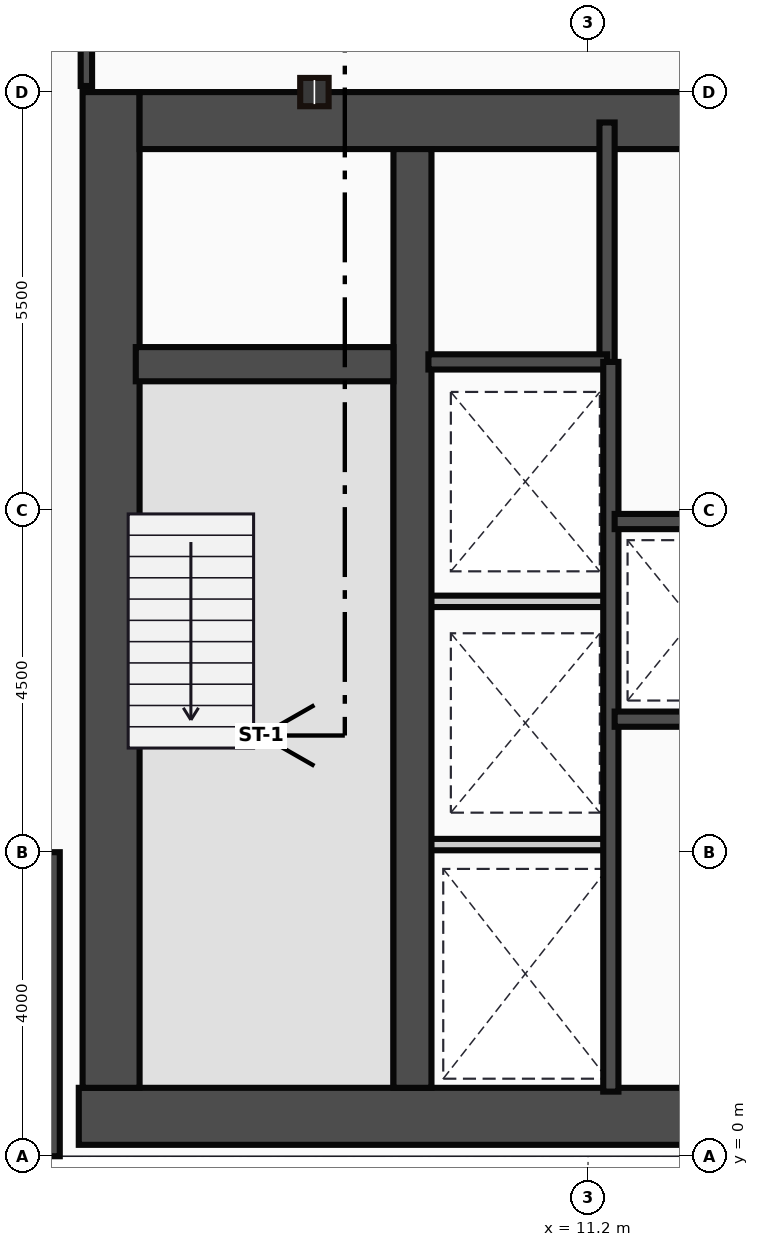
"""IFC4 building model, lengths in metres.
Left out: names, types, materials, properties, quantities, classifications, styles, units other than length and angle.
Written with IfcOpenShell. Run it as: python <this file> out.ifc"""

import sys

from ifc_helpers import new_model, si_unit, direction, frame, frame_2d, origin, origin_2d, place, context, subcontext, project, spatial, rectangle, i_section, extrude, source, transform, mapped, element, fill, save


model = new_model("IFC4")
c1 = context("Model", 3, precision=1e-05, world=origin(), true_north=direction((0.0, 1.0)))
c2 = subcontext(c1, "Body", "Model", "MODEL_VIEW")
j1 = project(units=[si_unit("LENGTHUNIT", "METRE"), si_unit("PLANEANGLEUNIT", "RADIAN")], contexts=[c1])
p1 = place(None, origin())
s1 = spatial("IfcSite", under=j1, at=p1, CompositionType="ELEMENT")
p2 = place(p1, origin())
s2 = spatial("IfcBuilding", under=s1, at=p2, CompositionType="ELEMENT")
p3 = place(p2, frame((0.0, 0.0, 184.4)))
s3 = spatial("IfcBuildingStorey", under=s2, at=p3, CompositionType="ELEMENT", Elevation=184.4)
m1 = source(origin(), c2, "Body", "SweptSolid", [
    extrude(rectangle(XDim=29.5, YDim=0.75, at=frame_2d((14.75, 0.0))), origin(), (0.0, 0.0, 1.0), 4.2),
])
p4 = place(p3, frame((4.5, 0.525, 0.0), z_axis=(0.0, 0.0, 1.0), x_axis=(1.0, 0.0, 0.0)))
e1 = element("IfcWall", 1, at=p4, inside=s3, PredefinedType="SHEAR", context=c2, shape_type="MappedRepresentation", body=[
    mapped(m1, transform((0.0, 0.0, 0.0))),
])
m2 = source(origin(), c2, "Body", "SweptSolid", [
    extrude(rectangle(XDim=13.1, YDim=0.75, at=frame_2d((6.55, 0.0))), origin(), (0.0, 0.0, 1.0), 4.2),
])
p5 = place(p3, frame((4.925, 0.9, 0.0), z_axis=(0.0, 0.0, 1.0), x_axis=(0.0, 1.0, 0.0)))
e2 = element("IfcWall", 2, at=p5, inside=s3, PredefinedType="SHEAR", context=c2, shape_type="MappedRepresentation", body=[
    mapped(m2, transform((0.0, 0.0, 0.0))),
])
m3 = source(origin(), c2, "Body", "SweptSolid", [
    extrude(rectangle(XDim=9.1, YDim=0.75, at=frame_2d((4.55, 0.0))), origin(), (0.0, 0.0, 1.0), 4.2),
])
p6 = place(p3, frame((5.3, 13.625, 0.0), z_axis=(0.0, 0.0, 1.0), x_axis=(1.0, 0.0, 0.0)))
e3 = element("IfcWall", 3, at=p6, inside=s3, PredefinedType="SHEAR", context=c2, shape_type="MappedRepresentation", body=[
    mapped(m3, transform((0.0, 0.0, 0.0))),
])
p7 = place(p6, frame((4.1, 0.0, 0.0)))
e4 = element("IfcOpeningElement", 4, at=p7, cuts=e3, PredefinedType="OPENING", context=c2, shape_type="SweptSolid", body=[
    extrude(rectangle(XDim=1.1, YDim=2.15, at=frame_2d((0.55, 1.075))), frame((0.0, 0.385, 0.0), z_axis=(0.0, -1.0, 0.0), x_axis=(1.0, 0.0, 0.0)), (0.0, 0.0, 1.0), 0.77),
])
m4 = source(origin(), c2, "Body", "SweptSolid", [
    extrude(rectangle(XDim=12.35, YDim=0.5, at=frame_2d((6.175, 0.0))), origin(), (0.0, 0.0, 1.0), 4.2),
])
p8 = place(p3, frame((8.89, 0.9, 0.0), z_axis=(0.0, 0.0, 1.0), x_axis=(0.0, 1.0, 0.0)))
e5 = element("IfcWall", 5, at=p8, inside=s3, PredefinedType="SHEAR", context=c2, shape_type="MappedRepresentation", body=[
    mapped(m4, transform((0.0, 0.0, 0.0))),
])
m5 = source(origin(), c2, "Body", "SweptSolid", [
    extrude(rectangle(XDim=3.39, YDim=0.45, at=frame_2d((1.695, 0.0))), origin(), (0.0, 0.0, 1.0), 4.2),
])
p9 = place(p3, frame((5.25, 10.42, 0.0), z_axis=(0.0, 0.0, 1.0), x_axis=(1.0, 0.0, 0.0)))
e6 = element("IfcWall", 6, at=p9, inside=s3, PredefinedType="SHEAR", context=c2, shape_type="MappedRepresentation", body=[
    mapped(m5, transform((0.0, 0.0, 0.0))),
])
p10 = place(p9, frame((1.05, 0.0, 0.0)))
e7 = element("IfcOpeningElement", 7, at=p10, cuts=e6, PredefinedType="OPENING", context=c2, shape_type="SweptSolid", body=[
    extrude(rectangle(XDim=1.1, YDim=2.15, at=frame_2d((0.55, 1.075))), frame((0.0, 0.235, 0.0), z_axis=(0.0, -1.0, 0.0), x_axis=(1.0, 0.0, 0.0)), (0.0, 0.0, 1.0), 0.47),
])
m6 = source(origin(), c2, "Body", "SweptSolid", [
    extrude(i_section(OverallWidth=0.374, OverallDepth=0.372, WebThickness=0.016, FlangeThickness=0.026, at=origin_2d()), origin(), (0.0, 0.0, 1.0), 4.2),
])
p11 = place(p3, frame((7.6, 14.0, 0.0), z_axis=(0.0, 0.0, 1.0), x_axis=(1.0, 0.0, 0.0)))
e8 = element("IfcColumn", 8, at=p11, inside=s3, PredefinedType="COLUMN", context=c2, shape_type="MappedRepresentation", body=[
    mapped(m6, transform((0.0, 0.0, 0.0))),
])
m7 = source(origin(), c2, "Body", "SweptSolid", [
    extrude(rectangle(XDim=4.0, YDim=0.25, at=frame_2d((2.0, 0.0))), origin(), (0.0, 0.0, 1.0), 3.95),
])
p12 = place(p3, frame((4.125, 4.0, 0.0), z_axis=(0.0, 0.0, 1.0), x_axis=(0.0, -1.0, 0.0)))
e9 = element("IfcWall", 9, at=p12, inside=s3, PredefinedType="STANDARD", context=c2, shape_type="MappedRepresentation", body=[
    mapped(m7, transform((0.0, 0.0, 0.0))),
])
m8 = source(origin(), c2, "Body", "SweptSolid", [
    extrude(rectangle(XDim=3.18, YDim=0.2, at=frame_2d((1.59, 0.0))), origin(), (0.0, 0.0, 1.0), 3.95),
])
p13 = place(p3, frame((11.45, 10.42, 0.0), z_axis=(0.0, 0.0, 1.0), x_axis=(0.0, 1.0, 0.0)))
e10 = element("IfcWall", 10, at=p13, inside=s3, PredefinedType="PARTITIONING", context=c2, shape_type="MappedRepresentation", body=[
    mapped(m8, transform((0.0, 0.0, 0.0))),
])
m9 = source(origin(), c2, "Body", "SweptSolid", [
    extrude(rectangle(XDim=2.35, YDim=0.2, at=frame_2d((1.175, 0.0))), origin(), (0.0, 0.0, 1.0), 3.95),
])
p14 = place(p3, frame((9.1, 10.45, 0.0), z_axis=(0.0, 0.0, 1.0), x_axis=(1.0, 0.0, 0.0)))
e11 = element("IfcWall", 11, at=p14, inside=s3, PredefinedType="PARTITIONING", context=c2, shape_type="MappedRepresentation", body=[
    mapped(m9, transform((0.0, 0.0, 0.0))),
])
p15 = place(p14, frame((0.55, 0.0, 0.0)))
e12 = element("IfcOpeningElement", 12, at=p15, cuts=e11, PredefinedType="OPENING", context=c2, shape_type="SweptSolid", body=[
    extrude(rectangle(XDim=1.1, YDim=2.15, at=frame_2d((0.55, 1.075))), frame((0.0, 0.11, 0.0), z_axis=(0.0, -1.0, 0.0), x_axis=(1.0, 0.0, 0.0)), (0.0, 0.0, 1.0), 0.22),
])
m10 = source(origin(), c2, "Body", "SweptSolid", [
    extrude(rectangle(XDim=9.6, YDim=0.2, at=frame_2d((4.8, 0.0))), origin(), (0.0, 0.0, 1.0), 3.95),
])
p16 = place(p3, frame((11.5, 0.85, 0.0), z_axis=(0.0, 0.0, 1.0), x_axis=(0.0, 1.0, 0.0)))
e13 = element("IfcWall", 13, at=p16, inside=s3, PredefinedType="PARTITIONING", context=c2, shape_type="MappedRepresentation", body=[
    mapped(m10, transform((0.0, 0.0, 0.0))),
])
p17 = place(p16, frame((4.2, 0.0, 0.0)))
e14 = element("IfcOpeningElement", 14, at=p17, cuts=e13, PredefinedType="OPENING", context=c2, shape_type="SweptSolid", body=[
    extrude(rectangle(XDim=1.1, YDim=2.15, at=frame_2d((0.55, 1.075))), frame((0.0, 0.11, 0.0), z_axis=(0.0, -1.0, 0.0), x_axis=(1.0, 0.0, 0.0)), (0.0, 0.0, 1.0), 0.22),
])
p18 = place(p16, frame((0.9, 0.0, 0.0)))
e15 = element("IfcOpeningElement", 15, at=p18, cuts=e13, PredefinedType="OPENING", context=c2, shape_type="SweptSolid", body=[
    extrude(rectangle(XDim=1.2, YDim=2.15, at=frame_2d((0.6, 1.075))), frame((0.0, 0.11, 0.0), z_axis=(0.0, -1.0, 0.0), x_axis=(1.0, 0.0, 0.0)), (0.0, 0.0, 1.0), 0.22),
])
m11 = source(origin(), c2, "Body", "SweptSolid", [
    extrude(rectangle(XDim=2.4, YDim=0.15, at=frame_2d((1.2, 0.0))), origin(), (0.0, 0.0, 1.0), 3.95),
])
for number, where, z_axis, x_axis in (
    (16, (9.1, 4.1, 0.0), (0.0, 0.0, 1.0), (1.0, 0.0, 0.0)),
    (17, (9.1, 7.3, 0.0), (0.0, 0.0, 1.0), (1.0, 0.0, 0.0)),
):
    element("IfcWall", number, at=place(p3, frame(where, z_axis=z_axis, x_axis=x_axis)), inside=s3, PredefinedType="PARTITIONING", context=c2, shape_type="MappedRepresentation", body=[
        mapped(m11, transform((0.0, 0.0, 0.0))),
    ])
m12 = source(origin(), c2, "Body", "SweptSolid", [
    extrude(rectangle(XDim=11.85, YDim=0.2, at=frame_2d((5.925, 0.0))), origin(), (0.0, 0.0, 1.0), 3.95),
])
p19 = place(p3, frame((11.55, 5.75, 0.0), z_axis=(0.0, 0.0, 1.0), x_axis=(1.0, 0.0, 0.0)))
e18 = element("IfcWall", 18, at=p19, inside=s3, PredefinedType="PARTITIONING", context=c2, shape_type="MappedRepresentation", body=[
    mapped(m12, transform((0.0, 0.0, 0.0))),
])
p20 = place(p19, frame((0.45, 0.0, 0.0)))
e19 = element("IfcOpeningElement", 19, at=p20, cuts=e18, PredefinedType="OPENING", context=c2, shape_type="SweptSolid", body=[
    extrude(rectangle(XDim=1.05, YDim=2.15, at=frame_2d((0.525, 1.075))), frame((0.0, 0.11, 0.0), z_axis=(0.0, -1.0, 0.0), x_axis=(1.0, 0.0, 0.0)), (0.0, 0.0, 1.0), 0.22),
])
p21 = place(p19, frame((2.4, 0.0, 0.0)))
e20 = element("IfcOpeningElement", 20, at=p21, cuts=e18, PredefinedType="OPENING", context=c2, shape_type="SweptSolid", body=[
    extrude(rectangle(XDim=1.05, YDim=2.15, at=frame_2d((0.525, 1.075))), frame((0.0, 0.11, 0.0), z_axis=(0.0, -1.0, 0.0), x_axis=(1.0, 0.0, 0.0)), (0.0, 0.0, 1.0), 0.22),
])
p22 = place(p19, frame((4.35, 0.0, 0.0)))
e21 = element("IfcOpeningElement", 21, at=p22, cuts=e18, PredefinedType="OPENING", context=c2, shape_type="SweptSolid", body=[
    extrude(rectangle(XDim=1.05, YDim=2.15, at=frame_2d((0.525, 1.075))), frame((0.0, 0.11, 0.0), z_axis=(0.0, -1.0, 0.0), x_axis=(1.0, 0.0, 0.0)), (0.0, 0.0, 1.0), 0.22),
])
p23 = place(p19, frame((6.3, 0.0, 0.0)))
e22 = element("IfcOpeningElement", 22, at=p23, cuts=e18, PredefinedType="OPENING", context=c2, shape_type="SweptSolid", body=[
    extrude(rectangle(XDim=1.05, YDim=2.15, at=frame_2d((0.525, 1.075))), frame((0.0, 0.11, 0.0), z_axis=(0.0, -1.0, 0.0), x_axis=(1.0, 0.0, 0.0)), (0.0, 0.0, 1.0), 0.22),
])
p24 = place(p19, frame((8.25, 0.0, 0.0)))
e23 = element("IfcOpeningElement", 23, at=p24, cuts=e18, PredefinedType="OPENING", context=c2, shape_type="SweptSolid", body=[
    extrude(rectangle(XDim=1.05, YDim=2.15, at=frame_2d((0.525, 1.075))), frame((0.0, 0.11, 0.0), z_axis=(0.0, -1.0, 0.0), x_axis=(1.0, 0.0, 0.0)), (0.0, 0.0, 1.0), 0.22),
])
p25 = place(p19, frame((10.2, 0.0, 0.0)))
e24 = element("IfcOpeningElement", 24, at=p25, cuts=e18, PredefinedType="OPENING", context=c2, shape_type="SweptSolid", body=[
    extrude(rectangle(XDim=1.05, YDim=2.15, at=frame_2d((0.525, 1.075))), frame((0.0, 0.11, 0.0), z_axis=(0.0, -1.0, 0.0), x_axis=(1.0, 0.0, 0.0)), (0.0, 0.0, 1.0), 0.22),
])
p26 = place(p3, frame((11.55, 8.35, 0.0), z_axis=(0.0, 0.0, 1.0), x_axis=(1.0, 0.0, 0.0)))
e25 = element("IfcWall", 25, at=p26, inside=s3, PredefinedType="PARTITIONING", context=c2, shape_type="MappedRepresentation", body=[
    mapped(m12, transform((0.0, 0.0, 0.0))),
])
m13 = source(origin(), c2, "Body", "SweptSolid", [
    extrude(rectangle(XDim=2.22, YDim=0.15, at=frame_2d((1.11, 0.0))), origin(), (0.0, 0.0, 1.0), 3.95),
])
p27 = place(p3, frame((4.6, 14.08, 0.0), z_axis=(0.0, 0.0, 1.0), x_axis=(0.0, 1.0, 0.0)))
e26 = element("IfcWall", 26, at=p27, inside=s3, PredefinedType="PARTITIONING", context=c2, shape_type="MappedRepresentation", body=[
    mapped(m13, transform((0.0, 0.0, 0.0))),
])
m14 = source(origin(), c2, "Body", "SweptSolid", [
    extrude(rectangle(XDim=1.1, YDim=2.15, at=frame_2d((0.55, 1.075))), frame((0.0, 0.025, 0.0), z_axis=(0.0, -1.0, 0.0), x_axis=(1.0, 0.0, 0.0)), (0.0, 0.0, 1.0), 0.05),
])
p28 = place(p10, frame((1.1, 0.0, 0.0), z_axis=(0.0, 0.0, 1.0), x_axis=(-1.0, 0.0, 0.0)))
e27 = element("IfcDoor", 27, at=p28, inside=s3, OperationType="SINGLE_SWING_LEFT", PredefinedType="DOOR", context=c2, shape_type="MappedRepresentation", body=[
    mapped(m14, transform((0.0, 0.0, 0.0))),
])
fill(e7, e27)
p29 = place(p7, origin())
e28 = element("IfcDoor", 28, at=p29, inside=s3, OperationType="SINGLE_SWING_RIGHT", PredefinedType="DOOR", context=c2, shape_type="MappedRepresentation", body=[
    mapped(m14, transform((0.0, 0.0, 0.0))),
])
fill(e4, e28)
p30 = place(p15, origin())
e29 = element("IfcDoor", 29, at=p30, inside=s3, OperationType="SLIDING_TO_LEFT", PredefinedType="DOOR", context=c2, shape_type="MappedRepresentation", body=[
    mapped(m14, transform((0.0, 0.0, 0.0))),
])
fill(e12, e29)
p31 = place(p17, frame((1.1, 0.0, 0.0), z_axis=(0.0, 0.0, 1.0), x_axis=(-1.0, 0.0, 0.0)))
e30 = element("IfcDoor", 30, at=p31, inside=s3, OperationType="SLIDING_TO_LEFT", PredefinedType="DOOR", context=c2, shape_type="MappedRepresentation", body=[
    mapped(m14, transform((0.0, 0.0, 0.0))),
])
fill(e14, e30)
m15 = source(origin(), c2, "Body", "SweptSolid", [
    extrude(rectangle(XDim=1.2, YDim=2.15, at=frame_2d((0.6, 1.075))), frame((0.0, 0.025, 0.0), z_axis=(0.0, -1.0, 0.0), x_axis=(1.0, 0.0, 0.0)), (0.0, 0.0, 1.0), 0.05),
])
p32 = place(p18, frame((1.2, 0.0, 0.0), z_axis=(0.0, 0.0, 1.0), x_axis=(-1.0, 0.0, 0.0)))
e31 = element("IfcDoor", 31, at=p32, inside=s3, OperationType="SLIDING_TO_LEFT", PredefinedType="DOOR", context=c2, shape_type="MappedRepresentation", body=[
    mapped(m15, transform((0.0, 0.0, 0.0))),
])
fill(e15, e31)
m16 = source(origin(), c2, "Body", "SweptSolid", [
    extrude(rectangle(XDim=1.05, YDim=2.15, at=frame_2d((0.525, 1.075))), frame((0.0, 0.025, 0.0), z_axis=(0.0, -1.0, 0.0), x_axis=(1.0, 0.0, 0.0)), (0.0, 0.0, 1.0), 0.05),
])
p33 = place(p20, frame((1.05, 0.0, 0.0), z_axis=(0.0, 0.0, 1.0), x_axis=(-1.0, 0.0, 0.0)))
e32 = element("IfcDoor", 32, at=p33, inside=s3, OperationType="SLIDING_TO_LEFT", PredefinedType="DOOR", context=c2, shape_type="MappedRepresentation", body=[
    mapped(m16, transform((0.0, 0.0, 0.0))),
])
fill(e19, e32)
save(model, sys.argv[1])
